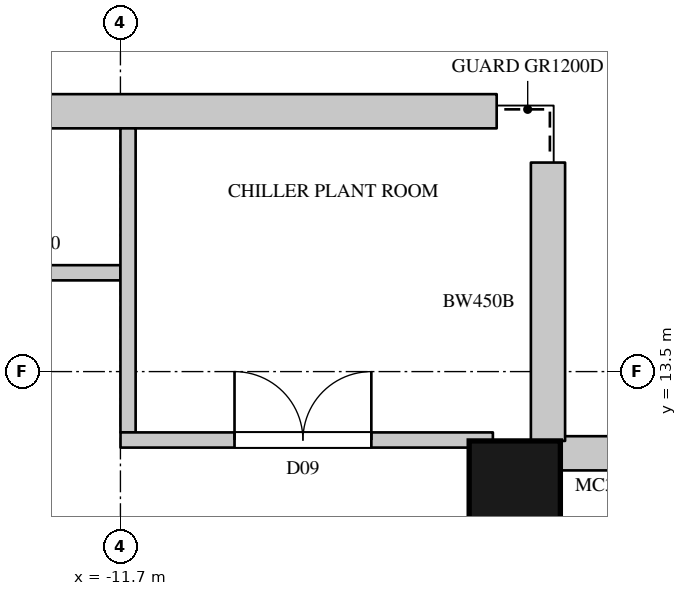
"""IFC4 building model, lengths in metres.
Left out: names, types, materials, properties, quantities, classifications, styles, units other than length and angle.
Written with IfcOpenShell. Run it as: python <this file> out.ifc"""

import sys

from ifc_helpers import new_model, si_unit, direction, frame, frame_2d, origin, origin_2d, place, context, subcontext, project, spatial, rectangle, circle, extrude, element, fill, save


model = new_model("IFC4")
c1 = context("Model", 3, precision=1e-05, world=origin(), true_north=direction((0.0, 1.0)))
c2 = subcontext(c1, "Body", "Model", "MODEL_VIEW")
j1 = project(units=[si_unit("LENGTHUNIT", "METRE"), si_unit("PLANEANGLEUNIT", "RADIAN")], contexts=[c1])
p1 = place(None, origin())
s1 = spatial("IfcSite", under=j1, at=p1, CompositionType="ELEMENT")
p2 = place(p1, origin())
s2 = spatial("IfcBuilding", under=s1, at=p2, CompositionType="ELEMENT")
p3 = place(p2, frame((0.0, 0.0, 335.0)))
s3 = spatial("IfcBuildingStorey", under=s2, at=p3, CompositionType="ELEMENT", Elevation=335.0)
p4 = place(p3, frame((-6.512, 11.988, 0.0), z_axis=(0.0, 0.0, 1.0), x_axis=(1.0, 0.0, 0.0)))
e1 = element("IfcColumn", 1, at=p4, inside=s3, PredefinedType="COLUMN", context=c2, shape_type="SweptSolid", body=[
    extrude(circle(Radius=0.6, at=origin_2d()), origin(), (0.0, 0.0, 1.0), 4.0),
])
p5 = place(p3, frame((7.912, 12.425, 0.0), z_axis=(0.0, 0.0, 1.0), x_axis=(-1.0, 0.0, 0.0)))
e2 = element("IfcWall", 2, at=p5, inside=s3, PredefinedType="SOLIDWALL", context=c2, shape_type="SweptSolid", body=[
    extrude(rectangle(XDim=13.824, YDim=0.45, at=frame_2d((6.912, 0.0))), origin(), (0.0, 0.0, 1.0), 3.7),
])
p6 = place(p3, frame((-6.075, 12.588, 0.0), z_axis=(0.0, 0.0, 1.0), x_axis=(0.0, 1.0, 0.0)))
e3 = element("IfcWall", 3, at=p6, inside=s3, PredefinedType="SOLIDWALL", context=c2, shape_type="SweptSolid", body=[
    extrude(rectangle(XDim=3.662, YDim=0.45, at=frame_2d((1.831, 0.0))), origin(), (0.0, 0.0, 1.0), 3.7),
])
p7 = place(p3, frame((-6.75, 16.925, 0.0), z_axis=(0.0, 0.0, 1.0), x_axis=(-1.0, 0.0, 0.0)))
e4 = element("IfcWall", 4, at=p7, inside=s3, PredefinedType="SOLIDWALL", context=c2, shape_type="SweptSolid", body=[
    extrude(rectangle(XDim=22.5, YDim=0.45, at=frame_2d((11.25, 0.0))), origin(), (0.0, 0.0, 1.0), 3.7),
])
p8 = place(p3, frame((-13.97, 14.8, 0.0), z_axis=(0.0, 0.0, 1.0), x_axis=(1.0, 0.0, 0.0)))
e5 = element("IfcWall", 5, at=p8, inside=s3, PredefinedType="PARTITIONING", context=c2, shape_type="SweptSolid", body=[
    extrude(rectangle(XDim=2.27, YDim=0.2, at=frame_2d((1.135, 0.0))), origin(), (0.0, 0.0, 1.0), 3.598),
])
p9 = place(p3, frame((-11.6, 12.701, 0.0), z_axis=(0.0, 0.0, 1.0), x_axis=(0.0, 1.0, 0.0)))
e6 = element("IfcWall", 6, at=p9, inside=s3, PredefinedType="PARTITIONING", context=c2, shape_type="SweptSolid", body=[
    extrude(rectangle(XDim=3.999, YDim=0.2, at=frame_2d((2.0, 0.0))), origin(), (0.0, 0.0, 1.0), 3.598),
])
p10 = place(p3, frame((-11.699, 12.6, 0.0), z_axis=(0.0, 0.0, 1.0), x_axis=(1.0, 0.0, 0.0)))
e7 = element("IfcWall", 7, at=p10, inside=s3, PredefinedType="PARTITIONING", context=c2, shape_type="SweptSolid", body=[
    extrude(rectangle(XDim=4.899, YDim=0.2, at=frame_2d((2.449, 0.0))), origin(), (0.0, 0.0, 1.0), 3.598),
])
p11 = place(p10, frame((1.5, 0.0, 0.0)))
e8 = element("IfcOpeningElement", 8, at=p11, cuts=e7, PredefinedType="OPENING", context=c2, shape_type="SweptSolid", body=[
    extrude(rectangle(XDim=1.8, YDim=2.4, at=frame_2d((0.9, 1.2))), frame((0.0, 0.11, 0.0), z_axis=(0.0, -1.0, 0.0), x_axis=(1.0, 0.0, 0.0)), (0.0, 0.0, 1.0), 0.22),
])
p12 = place(p11, origin())
e9 = element("IfcDoor", 9, at=p12, inside=s3, OperationType="DOUBLE_DOOR_SINGLE_SWING", PredefinedType="DOOR", context=c2, shape_type="SweptSolid", body=[
    extrude(rectangle(XDim=1.8, YDim=2.4, at=frame_2d((0.9, 1.2))), frame((0.0, 0.025, 0.0), z_axis=(0.0, -1.0, 0.0), x_axis=(1.0, 0.0, 0.0)), (0.0, 0.0, 1.0), 0.05),
])
fill(e8, e9)
save(model, sys.argv[1])
